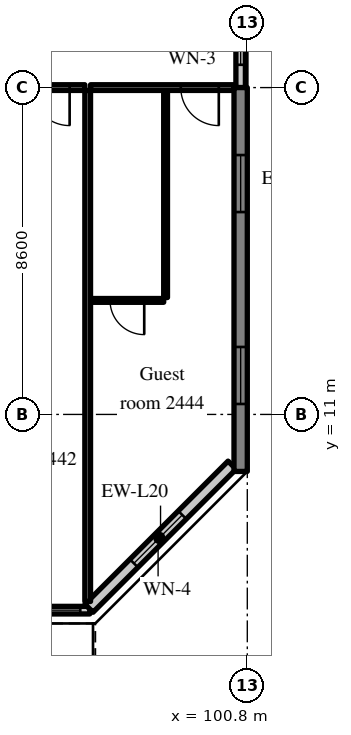
"""IFC4 building model, lengths in metres.
Left out: names, types, materials, properties, quantities, classifications, styles, units other than length and angle.
Written with IfcOpenShell. Run it as: python <this file> out.ifc"""

import sys

from ifc_helpers import new_model, si_unit, direction, frame, frame_2d, origin, place, context, subcontext, project, spatial, rectangle, extrude, source, transform, mapped, element, fill, save


model = new_model("IFC4")
c1 = context("Model", 3, precision=1e-05, world=origin(), true_north=direction((0.0, 1.0)))
c2 = subcontext(c1, "Body", "Model", "MODEL_VIEW")
j1 = project(units=[si_unit("LENGTHUNIT", "METRE"), si_unit("PLANEANGLEUNIT", "RADIAN")], contexts=[c1])
p1 = place(None, origin())
s1 = spatial("IfcSite", under=j1, at=p1, CompositionType="ELEMENT")
p2 = place(p1, origin())
s2 = spatial("IfcBuilding", under=s1, at=p2, CompositionType="ELEMENT")
p3 = place(p2, frame((0.0, 0.0, 102.8)))
s3 = spatial("IfcBuildingStorey", under=s2, at=p3, CompositionType="ELEMENT", Elevation=102.8)
m1 = source(origin(), c2, "Body", "SweptSolid", [
    extrude(rectangle(XDim=10.1, YDim=0.35, at=frame_2d((5.05, 0.0))), origin(), (0.0, 0.0, 1.0), 3.52),
])
p4 = place(p3, frame((100.625, 9.5, 0.0), z_axis=(0.0, 0.0, 1.0), x_axis=(0.0, 1.0, 0.0)))
e1 = element("IfcWall", 1, at=p4, inside=s3, PredefinedType="SHEAR", context=c2, shape_type="MappedRepresentation", body=[
    mapped(m1, transform((0.0, 0.0, 0.0), scale=1.0)),
])
m2 = source(origin(), c2, "Body", "SweptSolid", [
    extrude(rectangle(XDim=1.5, YDim=1.5, at=frame_2d((0.75, 0.75))), frame((0.0, 0.185, 0.0), z_axis=(0.0, -1.0, 0.0), x_axis=(1.0, 0.0, 0.0)), (0.0, 0.0, 1.0), 0.37),
])
p5 = place(p4, frame((1.775, 0.0, 0.9)))
e2 = element("IfcOpeningElement", 2, at=p5, cuts=e1, PredefinedType="OPENING", context=c2, shape_type="MappedRepresentation", body=[
    mapped(m2, transform((0.0, 0.0, 0.0), scale=1.0)),
])
p6 = place(p4, frame((6.825, 0.0, 0.9)))
e3 = element("IfcOpeningElement", 3, at=p6, cuts=e1, PredefinedType="OPENING", context=c2, shape_type="MappedRepresentation", body=[
    mapped(m2, transform((0.0, 0.0, 0.0), scale=1.0)),
])
m3 = source(origin(), c2, "Body", "SweptSolid", [
    extrude(rectangle(XDim=4.08, YDim=0.2, at=frame_2d((2.04, 0.0))), origin(), (0.0, 0.0, 1.0), 2.82),
])
p7 = place(p3, frame((92.575, 5.85, 0.0), z_axis=(0.0, 0.0, 1.0), x_axis=(1.0, 0.0, 0.0)))
e4 = element("IfcWall", 4, at=p7, inside=s3, PredefinedType="SOLIDWALL", context=c2, shape_type="MappedRepresentation", body=[
    mapped(m3, transform((0.0, 0.0, 0.0), scale=1.0)),
])
m4 = source(origin(), c2, "Body", "SweptSolid", [
    extrude(rectangle(XDim=1.2, YDim=2.4, at=frame_2d((0.6, 1.2))), frame((0.0, 0.11, 0.0), z_axis=(0.0, -1.0, 0.0), x_axis=(1.0, 0.0, 0.0)), (0.0, 0.0, 1.0), 0.22),
])
p8 = place(p7, frame((0.25, 0.0, 0.0)))
e5 = element("IfcOpeningElement", 5, at=p8, cuts=e4, PredefinedType="OPENING", context=c2, shape_type="MappedRepresentation", body=[
    mapped(m4, transform((0.0, 0.0, 0.0), scale=1.0)),
])
m5 = source(origin(), c2, "Body", "SweptSolid", [
    extrude(rectangle(XDim=1.5, YDim=1.5, at=frame_2d((0.75, 0.75))), frame((0.0, 0.11, 0.0), z_axis=(0.0, -1.0, 0.0), x_axis=(1.0, 0.0, 0.0)), (0.0, 0.0, 1.0), 0.22),
])
p9 = place(p7, frame((2.33, 0.0, 0.9)))
e6 = element("IfcOpeningElement", 6, at=p9, cuts=e4, PredefinedType="OPENING", context=c2, shape_type="MappedRepresentation", body=[
    mapped(m5, transform((0.0, 0.0, 0.0), scale=1.0)),
])
m6 = source(origin(), c2, "Body", "SweptSolid", [
    extrude(rectangle(XDim=5.326, YDim=0.3, at=frame_2d((2.663, 0.0))), origin(), (0.0, 0.0, 1.0), 3.52),
])
p10 = place(p3, frame((96.634, 5.9, 0.0), z_axis=(0.0, 0.0, 1.0), x_axis=(0.707083859269, 0.707129702361, 0.0)))
e7 = element("IfcWall", 7, at=p10, inside=s3, PredefinedType="SOLIDWALL", context=c2, shape_type="MappedRepresentation", body=[
    mapped(m6, transform((0.0, 0.0, 0.0), scale=1.0)),
])
m7 = source(origin(), c2, "Body", "SweptSolid", [
    extrude(rectangle(XDim=1.8, YDim=1.5, at=frame_2d((0.9, 0.75))), frame((0.0, 0.16, 0.0), z_axis=(0.0, -1.0, 0.0), x_axis=(1.0, 0.0, 0.0)), (0.0, 0.0, 1.0), 0.32),
])
p11 = place(p10, frame((1.672, 0.0, 0.9)))
e8 = element("IfcOpeningElement", 8, at=p11, cuts=e7, PredefinedType="OPENING", context=c2, shape_type="MappedRepresentation", body=[
    mapped(m7, transform((0.0, 0.0, 0.0), scale=1.0)),
])
m8 = source(origin(), c2, "Body", "SweptSolid", [
    extrude(rectangle(XDim=2.4, YDim=0.25, at=frame_2d((1.2, 0.0))), origin(), (0.0, 0.0, 1.0), 2.62),
])
p12 = place(p3, frame((100.625, 19.6, 0.0), z_axis=(0.0, 0.0, 1.0), x_axis=(0.0, 1.0, 0.0)))
e9 = element("IfcWall", 9, at=p12, inside=s3, PredefinedType="SOLIDWALL", context=c2, shape_type="MappedRepresentation", body=[
    mapped(m8, transform((0.0, 0.0, 0.0), scale=1.0)),
])
m9 = source(origin(), c2, "Body", "SweptSolid", [
    extrude(rectangle(XDim=1.2, YDim=1.5, at=frame_2d((0.6, 0.75))), frame((0.0, 0.135, 0.0), z_axis=(0.0, -1.0, 0.0), x_axis=(1.0, 0.0, 0.0)), (0.0, 0.0, 1.0), 0.27),
])
p13 = place(p12, frame((0.6, 0.0, 0.9)))
e10 = element("IfcOpeningElement", 10, at=p13, cuts=e9, PredefinedType="OPENING", context=c2, shape_type="MappedRepresentation", body=[
    mapped(m9, transform((0.0, 0.0, 0.0), scale=1.0)),
])
m10 = source(origin(), c2, "Body", "SweptSolid", [
    extrude(rectangle(XDim=3.95, YDim=0.15, at=frame_2d((1.975, 0.0))), origin(), (0.0, 0.0, 1.0), 2.82),
])
p14 = place(p3, frame((92.575, 19.6, 0.0), z_axis=(0.0, 0.0, 1.0), x_axis=(1.0, 0.0, 0.0)))
e11 = element("IfcWall", 11, at=p14, inside=s3, PredefinedType="PARTITIONING", context=c2, shape_type="MappedRepresentation", body=[
    mapped(m10, transform((0.0, 0.0, 0.0), scale=1.0)),
])
m11 = source(origin(), c2, "Body", "SweptSolid", [
    extrude(rectangle(XDim=1.0, YDim=2.1, at=frame_2d((0.5, 1.05))), frame((0.0, 0.085, 0.0), z_axis=(0.0, -1.0, 0.0), x_axis=(1.0, 0.0, 0.0)), (0.0, 0.0, 1.0), 0.17),
])
p15 = place(p14, frame((2.55, 0.0, 0.0)))
e12 = element("IfcOpeningElement", 12, at=p15, cuts=e11, PredefinedType="OPENING", context=c2, shape_type="MappedRepresentation", body=[
    mapped(m11, transform((0.0, 0.0, 0.0), scale=1.0)),
])
m12 = source(origin(), c2, "Body", "SweptSolid", [
    extrude(rectangle(XDim=5.45, YDim=0.1, at=frame_2d((2.725, 0.0))), origin(), (0.0, 0.0, 1.0), 3.52),
])
p16 = place(p3, frame((98.65, 14.075, 0.0), z_axis=(0.0, 0.0, 1.0), x_axis=(0.0, 1.0, 0.0)))
e13 = element("IfcWall", 13, at=p16, inside=s3, PredefinedType="PARTITIONING", context=c2, shape_type="MappedRepresentation", body=[
    mapped(m12, transform((0.0, 0.0, 0.0), scale=1.0)),
])
m13 = source(origin(), c2, "Body", "SweptSolid", [
    extrude(rectangle(XDim=1.925, YDim=0.1, at=frame_2d((0.962, 0.0))), origin(), (0.0, 0.0, 1.0), 3.52),
])
p17 = place(p3, frame((96.675, 14.0, 0.0), z_axis=(0.0, 0.0, 1.0), x_axis=(1.0, 0.0, 0.0)))
e14 = element("IfcWall", 14, at=p17, inside=s3, PredefinedType="PARTITIONING", context=c2, shape_type="MappedRepresentation", body=[
    mapped(m13, transform((0.0, 0.0, 0.0), scale=1.0)),
])
m14 = source(origin(), c2, "Body", "SweptSolid", [
    extrude(rectangle(XDim=0.9, YDim=2.1, at=frame_2d((0.45, 1.05))), frame((0.0, 0.06, 0.0), z_axis=(0.0, -1.0, 0.0), x_axis=(1.0, 0.0, 0.0)), (0.0, 0.0, 1.0), 0.12),
])
p18 = place(p17, frame((0.513, 0.0, 0.0)))
e15 = element("IfcOpeningElement", 15, at=p18, cuts=e14, PredefinedType="OPENING", context=c2, shape_type="MappedRepresentation", body=[
    mapped(m14, transform((0.0, 0.0, 0.0), scale=1.0)),
])
m15 = source(origin(), c2, "Body", "SweptSolid", [
    extrude(rectangle(XDim=3.775, YDim=0.15, at=frame_2d((1.887, 0.0))), origin(), (0.0, 0.0, 1.0), 2.82),
])
p19 = place(p3, frame((96.675, 19.6, 0.0), z_axis=(0.0, 0.0, 1.0), x_axis=(1.0, 0.0, 0.0)))
e16 = element("IfcWall", 16, at=p19, inside=s3, PredefinedType="PARTITIONING", context=c2, shape_type="MappedRepresentation", body=[
    mapped(m15, transform((0.0, 0.0, 0.0), scale=1.0)),
])
p20 = place(p19, frame((2.375, 0.0, 0.0)))
e17 = element("IfcOpeningElement", 17, at=p20, cuts=e16, PredefinedType="OPENING", context=c2, shape_type="MappedRepresentation", body=[
    mapped(m11, transform((0.0, 0.0, 0.0), scale=1.0)),
])
m16 = source(origin(), c2, "Body", "SweptSolid", [
    extrude(rectangle(XDim=13.447, YDim=0.15, at=frame_2d((6.724, 0.0))), origin(), (0.0, 0.0, 1.0), 3.52),
])
p21 = place(p3, frame((96.6, 6.078, 0.0), z_axis=(0.0, 0.0, 1.0), x_axis=(0.0, 1.0, 0.0)))
e18 = element("IfcWall", 18, at=p21, inside=s3, PredefinedType="PARTITIONING", context=c2, shape_type="MappedRepresentation", body=[
    mapped(m16, transform((0.0, 0.0, 0.0), scale=1.0)),
])
m17 = source(origin(), c2, "Body", "SweptSolid", [
    extrude(rectangle(XDim=1.5, YDim=1.5, at=frame_2d((0.75, 0.75))), frame((0.0, 0.03, 0.0), z_axis=(0.0, -1.0, 0.0), x_axis=(1.0, 0.0, 0.0)), (0.0, 0.0, 1.0), 0.06),
])
p22 = place(p9, origin())
e19 = element("IfcWindow", 19, at=p22, inside=s3, PartitioningType="SINGLE_PANEL", PredefinedType="WINDOW", context=c2, shape_type="MappedRepresentation", body=[
    mapped(m17, transform((0.0, 0.0, 0.0), scale=1.0)),
])
fill(e6, e19)
m18 = source(origin(), c2, "Body", "SweptSolid", [
    extrude(rectangle(XDim=1.8, YDim=1.5, at=frame_2d((0.9, 0.75))), frame((0.0, 0.03, 0.0), z_axis=(0.0, -1.0, 0.0), x_axis=(1.0, 0.0, 0.0)), (0.0, 0.0, 1.0), 0.06),
])
p23 = place(p11, origin())
e20 = element("IfcWindow", 20, at=p23, inside=s3, PartitioningType="SINGLE_PANEL", PredefinedType="WINDOW", context=c2, shape_type="MappedRepresentation", body=[
    mapped(m18, transform((0.0, 0.0, 0.0), scale=1.0)),
])
fill(e8, e20)
p24 = place(p5, origin())
e21 = element("IfcWindow", 21, at=p24, inside=s3, PartitioningType="SINGLE_PANEL", PredefinedType="WINDOW", context=c2, shape_type="MappedRepresentation", body=[
    mapped(m17, transform((0.0, 0.0, 0.0), scale=1.0)),
])
fill(e2, e21)
p25 = place(p6, origin())
e22 = element("IfcWindow", 22, at=p25, inside=s3, PartitioningType="SINGLE_PANEL", PredefinedType="WINDOW", context=c2, shape_type="MappedRepresentation", body=[
    mapped(m17, transform((0.0, 0.0, 0.0), scale=1.0)),
])
fill(e3, e22)
m19 = source(origin(), c2, "Body", "SweptSolid", [
    extrude(rectangle(XDim=1.2, YDim=1.5, at=frame_2d((0.6, 0.75))), frame((0.0, 0.03, 0.0), z_axis=(0.0, -1.0, 0.0), x_axis=(1.0, 0.0, 0.0)), (0.0, 0.0, 1.0), 0.06),
])
p26 = place(p13, origin())
e23 = element("IfcWindow", 23, at=p26, inside=s3, PartitioningType="SINGLE_PANEL", PredefinedType="WINDOW", context=c2, shape_type="MappedRepresentation", body=[
    mapped(m19, transform((0.0, 0.0, 0.0), scale=1.0)),
])
fill(e10, e23)
m20 = source(origin(), c2, "Body", "SweptSolid", [
    extrude(rectangle(XDim=1.0, YDim=2.1, at=frame_2d((0.5, 1.05))), frame((0.0, 0.025, 0.0), z_axis=(0.0, -1.0, 0.0), x_axis=(1.0, 0.0, 0.0)), (0.0, 0.0, 1.0), 0.05),
])
p27 = place(p15, origin())
e24 = element("IfcDoor", 24, at=p27, inside=s3, OperationType="SINGLE_SWING_RIGHT", PredefinedType="DOOR", context=c2, shape_type="MappedRepresentation", body=[
    mapped(m20, transform((0.0, 0.0, 0.0), scale=1.0)),
])
fill(e12, e24)
m21 = source(origin(), c2, "Body", "SweptSolid", [
    extrude(rectangle(XDim=0.9, YDim=2.1, at=frame_2d((0.45, 1.05))), frame((0.0, 0.025, 0.0), z_axis=(0.0, -1.0, 0.0), x_axis=(1.0, 0.0, 0.0)), (0.0, 0.0, 1.0), 0.05),
])
p28 = place(p18, origin())
e25 = element("IfcDoor", 25, at=p28, inside=s3, OperationType="SINGLE_SWING_RIGHT", PredefinedType="DOOR", context=c2, shape_type="MappedRepresentation", body=[
    mapped(m21, transform((0.0, 0.0, 0.0), scale=1.0)),
])
fill(e15, e25)
p29 = place(p20, origin())
e26 = element("IfcDoor", 26, at=p29, inside=s3, OperationType="SINGLE_SWING_RIGHT", PredefinedType="DOOR", context=c2, shape_type="MappedRepresentation", body=[
    mapped(m20, transform((0.0, 0.0, 0.0), scale=1.0)),
])
fill(e17, e26)
save(model, sys.argv[1])
